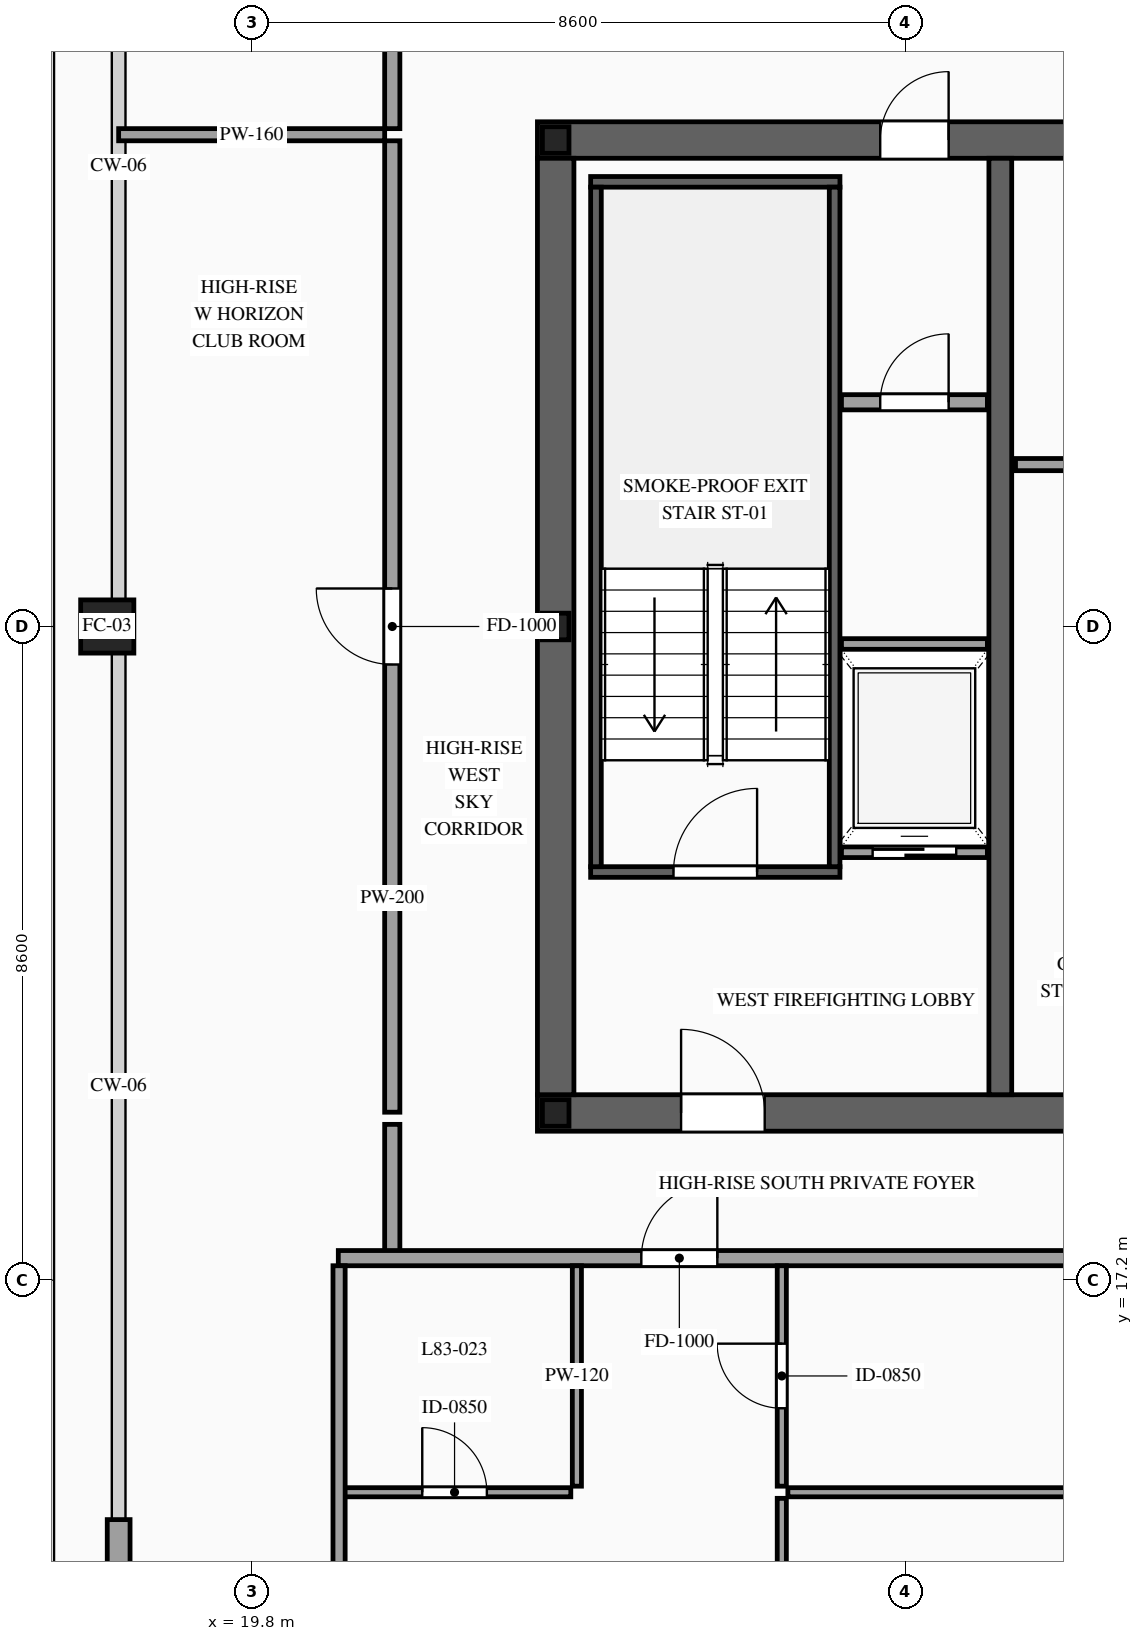
"""IFC4 building model, lengths in metres.
Left out: names, types, materials, properties, quantities, classifications, styles, units other than length and angle.
Written with IfcOpenShell. Run it as: python <this file> out.ifc"""

import sys

from ifc_helpers import new_model, si_unit, direction, frame, frame_2d, origin, origin_2d, place, context, subcontext, project, spatial, rectangle, hollow_rectangle, i_section, extrude, source, transform, mapped, element, fill, save


model = new_model("IFC4")
c1 = context("Model", 3, precision=1e-05, world=origin(), true_north=direction((0.0, 1.0)))
c2 = subcontext(c1, "Body", "Model", "MODEL_VIEW")
j1 = project(units=[si_unit("LENGTHUNIT", "METRE"), si_unit("PLANEANGLEUNIT", "RADIAN")], contexts=[c1])
p1 = place(None, origin())
s1 = spatial("IfcSite", under=j1, at=p1, CompositionType="ELEMENT")
p2 = place(p1, origin())
s2 = spatial("IfcBuilding", under=s1, at=p2, CompositionType="ELEMENT")
p3 = place(p2, frame((0.0, 0.0, 311.2)))
s3 = spatial("IfcBuildingStorey", under=s2, at=p3, CompositionType="ELEMENT", Elevation=311.2)
p4 = place(p3, frame((23.56, 19.4, 0.0), z_axis=(0.0, 0.0, 1.0), x_axis=(1.0, 0.0, 0.0)))
e1 = element("IfcWall", 1, at=p4, inside=s3, PredefinedType="SHEAR", context=c2, shape_type="SweptSolid", body=[
    extrude(rectangle(XDim=26.88, YDim=0.48, at=frame_2d((13.44, 0.0))), origin(), (0.0, 0.0, 1.0), 3.5),
])
p5 = place(p4, frame((1.89, 0.0, 0.0)))
e2 = element("IfcOpeningElement", 2, at=p5, cuts=e1, PredefinedType="OPENING", context=c2, shape_type="SweptSolid", body=[
    extrude(rectangle(XDim=1.1, YDim=2.2, at=frame_2d((0.55, 1.1))), frame((0.0, 0.255, 0.0), z_axis=(0.0, -1.0, 0.0), x_axis=(1.0, 0.0, 0.0)), (0.0, 0.0, 1.0), 0.51),
])
p6 = place(p4, frame((9.79, 0.0, 0.0)))
e3 = element("IfcOpeningElement", 3, at=p6, cuts=e1, PredefinedType="OPENING", context=c2, shape_type="SweptSolid", body=[
    extrude(rectangle(XDim=1.1, YDim=2.2, at=frame_2d((0.55, 1.1))), frame((0.0, 0.255, 0.0), z_axis=(0.0, -1.0, 0.0), x_axis=(1.0, 0.0, 0.0)), (0.0, 0.0, 1.0), 0.51),
])
p7 = place(p4, frame((22.99, 0.0, 0.0)))
e4 = element("IfcOpeningElement", 4, at=p7, cuts=e1, PredefinedType="OPENING", context=c2, shape_type="SweptSolid", body=[
    extrude(rectangle(XDim=1.1, YDim=2.2, at=frame_2d((0.55, 1.1))), frame((0.0, 0.255, 0.0), z_axis=(0.0, -1.0, 0.0), x_axis=(1.0, 0.0, 0.0)), (0.0, 0.0, 1.0), 0.51),
])
p8 = place(p4, frame((19.61, 0.0, 0.0)))
e5 = element("IfcOpeningElement", 5, at=p8, cuts=e1, PredefinedType="OPENING", context=c2, shape_type="SweptSolid", body=[
    extrude(rectangle(XDim=0.9, YDim=2.15, at=frame_2d((0.45, 1.075))), frame((0.0, 0.255, 0.0), z_axis=(0.0, -1.0, 0.0), x_axis=(1.0, 0.0, 0.0)), (0.0, 0.0, 1.0), 0.51),
])
p9 = place(p4, frame((18.17, 0.0, 0.0)))
e6 = element("IfcOpeningElement", 6, at=p9, cuts=e1, PredefinedType="OPENING", context=c2, shape_type="SweptSolid", body=[
    extrude(rectangle(XDim=0.9, YDim=2.15, at=frame_2d((0.45, 1.075))), frame((0.0, 0.255, 0.0), z_axis=(0.0, -1.0, 0.0), x_axis=(1.0, 0.0, 0.0)), (0.0, 0.0, 1.0), 0.51),
])
p10 = place(p3, frame((23.56, 32.2, 0.0), z_axis=(0.0, 0.0, 1.0), x_axis=(1.0, 0.0, 0.0)))
e7 = element("IfcWall", 7, at=p10, inside=s3, PredefinedType="SHEAR", context=c2, shape_type="SweptSolid", body=[
    extrude(rectangle(XDim=26.88, YDim=0.48, at=frame_2d((13.44, 0.0))), origin(), (0.0, 0.0, 1.0), 3.5),
])
p11 = place(p10, frame((4.51, 0.0, 0.0)))
e8 = element("IfcOpeningElement", 8, at=p11, cuts=e7, PredefinedType="OPENING", context=c2, shape_type="SweptSolid", body=[
    extrude(rectangle(XDim=0.9, YDim=2.15, at=frame_2d((0.45, 1.075))), frame((0.0, 0.255, 0.0), z_axis=(0.0, -1.0, 0.0), x_axis=(1.0, 0.0, 0.0)), (0.0, 0.0, 1.0), 0.51),
])
p12 = place(p10, frame((9.79, 0.0, 0.0)))
e9 = element("IfcOpeningElement", 9, at=p12, cuts=e7, PredefinedType="OPENING", context=c2, shape_type="SweptSolid", body=[
    extrude(rectangle(XDim=1.1, YDim=2.2, at=frame_2d((0.55, 1.1))), frame((0.0, 0.255, 0.0), z_axis=(0.0, -1.0, 0.0), x_axis=(1.0, 0.0, 0.0)), (0.0, 0.0, 1.0), 0.51),
])
p13 = place(p10, frame((15.64, 0.0, 0.0)))
e10 = element("IfcOpeningElement", 10, at=p13, cuts=e7, PredefinedType="OPENING", context=c2, shape_type="SweptSolid", body=[
    extrude(rectangle(XDim=1.1, YDim=2.2, at=frame_2d((0.55, 1.1))), frame((0.0, 0.255, 0.0), z_axis=(0.0, -1.0, 0.0), x_axis=(1.0, 0.0, 0.0)), (0.0, 0.0, 1.0), 0.51),
])
p14 = place(p10, frame((18.74, 0.0, 0.0)))
e11 = element("IfcOpeningElement", 11, at=p14, cuts=e7, PredefinedType="OPENING", context=c2, shape_type="SweptSolid", body=[
    extrude(rectangle(XDim=1.1, YDim=2.2, at=frame_2d((0.55, 1.1))), frame((0.0, 0.255, 0.0), z_axis=(0.0, -1.0, 0.0), x_axis=(1.0, 0.0, 0.0)), (0.0, 0.0, 1.0), 0.51),
])
m1 = source(origin(), c2, "Body", "SweptSolid", [
    extrude(rectangle(XDim=12.32, YDim=0.48, at=frame_2d((6.16, 0.0))), origin(), (0.0, 0.0, 1.0), 3.5),
])
p15 = place(p3, frame((23.8, 19.64, 0.0), z_axis=(0.0, 0.0, 1.0), x_axis=(0.0, 1.0, 0.0)))
e12 = element("IfcWall", 12, at=p15, inside=s3, PredefinedType="SHEAR", context=c2, shape_type="MappedRepresentation", body=[
    mapped(m1, transform((0.0, 0.0, 0.0), scale=1.0)),
])
m2 = source(origin(), c2, "Body", "SweptSolid", [
    extrude(rectangle(XDim=12.32, YDim=0.3, at=frame_2d((6.16, 0.0))), origin(), (0.0, 0.0, 1.0), 3.5),
])
p16 = place(p3, frame((29.65, 19.64, 0.0), z_axis=(0.0, 0.0, 1.0), x_axis=(0.0, 1.0, 0.0)))
e13 = element("IfcWall", 13, at=p16, inside=s3, PredefinedType="SOLIDWALL", context=c2, shape_type="MappedRepresentation", body=[
    mapped(m2, transform((0.0, 0.0, 0.0), scale=1.0)),
])
m3 = source(origin(), c2, "Body", "SweptSolid", [
    extrude(i_section(OverallWidth=0.35, OverallDepth=0.35, WebThickness=0.012, FlangeThickness=0.019, at=origin_2d()), origin(), (0.0, 0.0, 1.0), 3.5),
])
for number, where, z_axis, x_axis in (
    (14, (23.8, 19.4, 0.0), (0.0, 0.0, 1.0), (1.0, 0.0, 0.0)),
    (15, (23.8, 25.8, 0.0), (0.0, 0.0, 1.0), (1.0, 0.0, 0.0)),
    (16, (23.8, 32.2, 0.0), (0.0, 0.0, 1.0), (1.0, 0.0, 0.0)),
):
    element("IfcColumn", number, at=place(p3, frame(where, z_axis=z_axis, x_axis=x_axis)), inside=s3, PredefinedType="COLUMN", context=c2, shape_type="MappedRepresentation", body=[
        mapped(m3, transform((0.0, 0.0, 0.0), scale=1.0)),
    ])
m4 = source(origin(), c2, "Body", "SweptSolid", [
    extrude(hollow_rectangle(XDim=0.7, YDim=0.7, WallThickness=0.032, at=origin_2d()), origin(), (0.0, 0.0, 1.0), 3.5),
])
p17 = place(p3, frame((17.9, 25.8, 0.0), z_axis=(0.0, 0.0, 1.0), x_axis=(1.0, 0.0, 0.0)))
e17 = element("IfcColumn", 17, at=p17, inside=s3, PredefinedType="COLUMN", context=c2, shape_type="MappedRepresentation", body=[
    mapped(m4, transform((0.0, 0.0, 0.0), scale=1.0)),
])
m5 = source(origin(), c2, "Body", "SweptSolid", [
    extrude(rectangle(XDim=3.25, YDim=0.3, at=frame_2d((1.625, 0.0))), origin(), (0.0, 0.0, 1.0), 2.885),
])
p18 = place(p3, frame((18.05, 10.8, 0.0), z_axis=(0.0, 0.0, 1.0), x_axis=(0.0, 1.0, 0.0)))
e18 = element("IfcWall", 18, at=p18, inside=s3, PredefinedType="SOLIDWALL", context=c2, shape_type="MappedRepresentation", body=[
    mapped(m5, transform((0.0, 0.0, 0.0), scale=1.0)),
])
p19 = place(p3, frame((27.56, 22.83, 0.0), z_axis=(0.0, 0.0, 1.0), x_axis=(1.0, 0.0, 0.0)))
e19 = element("IfcWall", 19, at=p19, inside=s3, PredefinedType="SOLIDWALL", context=c2, shape_type="SweptSolid", body=[
    extrude(rectangle(XDim=1.92, YDim=0.14, at=frame_2d((0.96, 0.0))), origin(), (0.0, 0.0, 1.0), 3.28),
])
p20 = place(p19, frame((0.41, 0.0, 0.0)))
e20 = element("IfcOpeningElement", 20, at=p20, cuts=e19, PredefinedType="OPENING", context=c2, shape_type="SweptSolid", body=[
    extrude(rectangle(XDim=1.1, YDim=2.2, at=frame_2d((0.55, 1.1))), frame((0.0, 0.085, 0.0), z_axis=(0.0, -1.0, 0.0), x_axis=(1.0, 0.0, 0.0)), (0.0, 0.0, 1.0), 0.17),
])
m6 = source(origin(), c2, "Body", "SweptSolid", [
    extrude(rectangle(XDim=1.92, YDim=0.14, at=frame_2d((0.96, 0.0))), origin(), (0.0, 0.0, 1.0), 3.28),
])
p21 = place(p3, frame((27.56, 25.57, 0.0), z_axis=(0.0, 0.0, 1.0), x_axis=(1.0, 0.0, 0.0)))
e21 = element("IfcWall", 21, at=p21, inside=s3, PredefinedType="SOLIDWALL", context=c2, shape_type="MappedRepresentation", body=[
    mapped(m6, transform((0.0, 0.0, 0.0), scale=1.0)),
])
p22 = place(p3, frame((24.26, 22.57, 0.0), z_axis=(0.0, 0.0, 1.0), x_axis=(1.0, 0.0, 0.0)))
e22 = element("IfcWall", 22, at=p22, inside=s3, PredefinedType="SOLIDWALL", context=c2, shape_type="SweptSolid", body=[
    extrude(rectangle(XDim=3.28, YDim=0.14, at=frame_2d((1.64, 0.0))), origin(), (0.0, 0.0, 1.0), 3.28),
])
p23 = place(p22, frame((1.09, 0.0, 0.0)))
e23 = element("IfcOpeningElement", 23, at=p23, cuts=e22, PredefinedType="OPENING", context=c2, shape_type="SweptSolid", body=[
    extrude(rectangle(XDim=1.1, YDim=2.2, at=frame_2d((0.55, 1.1))), frame((0.0, 0.085, 0.0), z_axis=(0.0, -1.0, 0.0), x_axis=(1.0, 0.0, 0.0)), (0.0, 0.0, 1.0), 0.17),
])
m7 = source(origin(), c2, "Body", "SweptSolid", [
    extrude(rectangle(XDim=3.28, YDim=0.14, at=frame_2d((1.64, 0.0))), origin(), (0.0, 0.0, 1.0), 3.28),
])
p24 = place(p3, frame((24.26, 31.65, 0.0), z_axis=(0.0, 0.0, 1.0), x_axis=(1.0, 0.0, 0.0)))
e24 = element("IfcWall", 24, at=p24, inside=s3, PredefinedType="SOLIDWALL", context=c2, shape_type="MappedRepresentation", body=[
    mapped(m7, transform((0.0, 0.0, 0.0), scale=1.0)),
])
m8 = source(origin(), c2, "Body", "SweptSolid", [
    extrude(rectangle(XDim=8.94, YDim=0.14, at=frame_2d((4.47, 0.0))), origin(), (0.0, 0.0, 1.0), 3.28),
])
for number, where, z_axis, x_axis in (
    (25, (24.33, 22.64, 0.0), (0.0, 0.0, 1.0), (0.0, 1.0, 0.0)),
    (26, (27.47, 22.64, 0.0), (0.0, 0.0, 1.0), (0.0, 1.0, 0.0)),
):
    element("IfcWall", number, at=place(p3, frame(where, z_axis=z_axis, x_axis=x_axis)), inside=s3, PredefinedType="SOLIDWALL", context=c2, shape_type="MappedRepresentation", body=[
        mapped(m8, transform((0.0, 0.0, 0.0), scale=1.0)),
    ])
p25 = place(p3, frame((27.56, 28.75, 0.0), z_axis=(0.0, 0.0, 1.0), x_axis=(1.0, 0.0, 0.0)))
e27 = element("IfcWall", 27, at=p25, inside=s3, PredefinedType="PARTITIONING", context=c2, shape_type="SweptSolid", body=[
    extrude(rectangle(XDim=1.92, YDim=0.2, at=frame_2d((0.96, 0.0))), origin(), (0.0, 0.0, 1.0), 3.28),
])
p26 = place(p25, frame((0.51, 0.0, 0.0)))
e28 = element("IfcOpeningElement", 28, at=p26, cuts=e27, PredefinedType="OPENING", context=c2, shape_type="SweptSolid", body=[
    extrude(rectangle(XDim=0.9, YDim=2.15, at=frame_2d((0.45, 1.075))), frame((0.0, 0.115, 0.0), z_axis=(0.0, -1.0, 0.0), x_axis=(1.0, 0.0, 0.0)), (0.0, 0.0, 1.0), 0.23),
])
m9 = source(origin(), c2, "Body", "SweptSolid", [
    extrude(rectangle(XDim=2.47, YDim=0.16, at=frame_2d((1.235, 0.0))), origin(), (0.0, 0.0, 1.0), 3.28),
])
p27 = place(p3, frame((29.85, 27.93, 0.0), z_axis=(0.0, 0.0, 1.0), x_axis=(1.0, 0.0, 0.0)))
e29 = element("IfcWall", 29, at=p27, inside=s3, PredefinedType="PARTITIONING", context=c2, shape_type="MappedRepresentation", body=[
    mapped(m9, transform((0.0, 0.0, 0.0), scale=1.0)),
])
m10 = source(origin(), c2, "Body", "SweptSolid", [
    extrude(rectangle(XDim=1.7, YDim=0.2, at=frame_2d((0.85, 0.0))), origin(), (0.0, 0.0, 1.0), 3.28),
])
for number, where, z_axis, x_axis in (
    (30, (21.65, 32.35, 0.0), (0.0, 0.0, 1.0), (0.0, 1.0, 0.0)),
    (31, (21.65, 17.55, 0.0), (0.0, 0.0, 1.0), (0.0, 1.0, 0.0)),
):
    element("IfcWall", number, at=place(p3, frame(where, z_axis=z_axis, x_axis=x_axis)), inside=s3, PredefinedType="PARTITIONING", context=c2, shape_type="MappedRepresentation", body=[
        mapped(m10, transform((0.0, 0.0, 0.0), scale=1.0)),
    ])
p28 = place(p3, frame((20.94, 17.49, 0.0), z_axis=(0.0, 0.0, 1.0), x_axis=(1.0, 0.0, 0.0)))
e32 = element("IfcWall", 32, at=p28, inside=s3, PredefinedType="PARTITIONING", context=c2, shape_type="SweptSolid", body=[
    extrude(rectangle(XDim=10.198, YDim=0.2, at=frame_2d((5.099, 0.0))), origin(), (0.0, 0.0, 1.0), 3.28),
])
p29 = place(p28, frame((3.987, 0.0, 0.0)))
e33 = element("IfcOpeningElement", 33, at=p29, cuts=e32, PredefinedType="OPENING", context=c2, shape_type="SweptSolid", body=[
    extrude(rectangle(XDim=1.0, YDim=2.2, at=frame_2d((0.5, 1.1))), frame((0.0, 0.115, 0.0), z_axis=(0.0, -1.0, 0.0), x_axis=(1.0, 0.0, 0.0)), (0.0, 0.0, 1.0), 0.23),
])
p30 = place(p3, frame((20.94, 14.41, 0.0), z_axis=(0.0, 0.0, 1.0), x_axis=(1.0, 0.0, 0.0)))
e34 = element("IfcWall", 34, at=p30, inside=s3, PredefinedType="PARTITIONING", context=c2, shape_type="SweptSolid", body=[
    extrude(rectangle(XDim=3.059, YDim=0.12, at=frame_2d((1.53, 0.0))), origin(), (0.0, 0.0, 1.0), 3.28),
])
p31 = place(p30, frame((1.104, 0.0, 0.0)))
e35 = element("IfcOpeningElement", 35, at=p31, cuts=e34, PredefinedType="OPENING", context=c2, shape_type="SweptSolid", body=[
    extrude(rectangle(XDim=0.85, YDim=2.1, at=frame_2d((0.425, 1.05))), frame((0.0, 0.075, 0.0), z_axis=(0.0, -1.0, 0.0), x_axis=(1.0, 0.0, 0.0)), (0.0, 0.0, 1.0), 0.15),
])
m11 = source(origin(), c2, "Body", "SweptSolid", [
    extrude(rectangle(XDim=2.9, YDim=0.12, at=frame_2d((1.45, 0.0))), origin(), (0.0, 0.0, 1.0), 3.28),
])
p32 = place(p3, frame((24.079, 14.49, 0.0), z_axis=(0.0, 0.0, 1.0), x_axis=(0.0, 1.0, 0.0)))
e36 = element("IfcWall", 36, at=p32, inside=s3, PredefinedType="PARTITIONING", context=c2, shape_type="MappedRepresentation", body=[
    mapped(m11, transform((0.0, 0.0, 0.0), scale=1.0)),
])
m12 = source(origin(), c2, "Body", "SweptSolid", [
    extrude(rectangle(XDim=4.283, YDim=0.12, at=frame_2d((2.142, 0.0))), origin(), (0.0, 0.0, 1.0), 3.28),
])
p33 = place(p3, frame((26.855, 14.41, 0.0), z_axis=(0.0, 0.0, 1.0), x_axis=(1.0, 0.0, 0.0)))
e37 = element("IfcWall", 37, at=p33, inside=s3, PredefinedType="PARTITIONING", context=c2, shape_type="MappedRepresentation", body=[
    mapped(m12, transform((0.0, 0.0, 0.0), scale=1.0)),
])
p34 = place(p3, frame((26.775, 14.49, 0.0), z_axis=(0.0, 0.0, 1.0), x_axis=(0.0, 1.0, 0.0)))
e38 = element("IfcWall", 38, at=p34, inside=s3, PredefinedType="PARTITIONING", context=c2, shape_type="SweptSolid", body=[
    extrude(rectangle(XDim=2.9, YDim=0.12, at=frame_2d((1.45, 0.0))), origin(), (0.0, 0.0, 1.0), 3.28),
])
p35 = place(p34, frame((1.025, 0.0, 0.0)))
e39 = element("IfcOpeningElement", 39, at=p35, cuts=e38, PredefinedType="OPENING", context=c2, shape_type="SweptSolid", body=[
    extrude(rectangle(XDim=0.85, YDim=2.1, at=frame_2d((0.425, 1.05))), frame((0.0, 0.075, 0.0), z_axis=(0.0, -1.0, 0.0), x_axis=(1.0, 0.0, 0.0)), (0.0, 0.0, 1.0), 0.15),
])
p36 = place(p3, frame((26.775, 6.85, 0.0), z_axis=(0.0, 0.0, 1.0), x_axis=(0.0, 1.0, 0.0)))
e40 = element("IfcWall", 40, at=p36, inside=s3, PredefinedType="PARTITIONING", context=c2, shape_type="SweptSolid", body=[
    extrude(rectangle(XDim=7.48, YDim=0.12, at=frame_2d((3.74, 0.0))), origin(), (0.0, 0.0, 1.0), 3.28),
])
p37 = place(p36, frame((3.29, 0.0, 0.0)))
e41 = element("IfcOpeningElement", 41, at=p37, cuts=e40, PredefinedType="OPENING", context=c2, shape_type="SweptSolid", body=[
    extrude(rectangle(XDim=0.9, YDim=2.15, at=frame_2d((0.45, 1.075))), frame((0.0, 0.075, 0.0), z_axis=(0.0, -1.0, 0.0), x_axis=(1.0, 0.0, 0.0)), (0.0, 0.0, 1.0), 0.15),
])
m13 = source(origin(), c2, "Body", "SweptSolid", [
    extrude(rectangle(XDim=10.39, YDim=0.16, at=frame_2d((5.195, 0.0))), origin(), (0.0, 0.0, 1.0), 3.28),
])
p38 = place(p3, frame((20.95, 7.0, 0.0), z_axis=(0.0, 0.0, 1.0), x_axis=(0.0, 1.0, 0.0)))
e42 = element("IfcWall", 42, at=p38, inside=s3, PredefinedType="PARTITIONING", context=c2, shape_type="MappedRepresentation", body=[
    mapped(m13, transform((0.0, 0.0, 0.0), scale=1.0)),
])
p39 = place(p3, frame((21.65, 19.41, 0.0), z_axis=(0.0, 0.0, 1.0), x_axis=(0.0, 1.0, 0.0)))
e43 = element("IfcWall", 43, at=p39, inside=s3, PredefinedType="PARTITIONING", context=c2, shape_type="SweptSolid", body=[
    extrude(rectangle(XDim=12.78, YDim=0.2, at=frame_2d((6.39, 0.0))), origin(), (0.0, 0.0, 1.0), 3.28),
])
p40 = place(p39, frame((5.89, 0.0, 0.0)))
e44 = element("IfcOpeningElement", 44, at=p40, cuts=e43, PredefinedType="OPENING", context=c2, shape_type="SweptSolid", body=[
    extrude(rectangle(XDim=1.0, YDim=2.2, at=frame_2d((0.5, 1.1))), frame((0.0, 0.115, 0.0), z_axis=(0.0, -1.0, 0.0), x_axis=(1.0, 0.0, 0.0)), (0.0, 0.0, 1.0), 0.23),
])
m14 = source(origin(), c2, "Body", "SweptSolid", [
    extrude(rectangle(XDim=3.5, YDim=0.16, at=frame_2d((1.75, 0.0))), origin(), (0.0, 0.0, 1.0), 2.825),
])
p41 = place(p3, frame((18.05, 32.27, 0.0), z_axis=(0.0, 0.0, 1.0), x_axis=(1.0, 0.0, 0.0)))
e45 = element("IfcWall", 45, at=p41, inside=s3, PredefinedType="PARTITIONING", context=c2, shape_type="MappedRepresentation", body=[
    mapped(m14, transform((0.0, 0.0, 0.0), scale=1.0)),
])
m15 = source(origin(), c2, "Body", "SweptSolid", [
    extrude(rectangle(XDim=1.1, YDim=2.2, at=frame_2d((0.55, 1.1))), frame((0.0, 0.025, 0.0), z_axis=(0.0, -1.0, 0.0), x_axis=(1.0, 0.0, 0.0)), (0.0, 0.0, 1.0), 0.05),
])
p42 = place(p20, origin())
e46 = element("IfcDoor", 46, at=p42, inside=s3, OperationType="SLIDING_TO_LEFT", PredefinedType="DOOR", context=c2, shape_type="MappedRepresentation", body=[
    mapped(m15, transform((0.0, 0.0, 0.0), scale=1.0)),
])
fill(e20, e46)
m16 = source(origin(), c2, "Body", "SweptSolid", [
    extrude(rectangle(XDim=1.1, YDim=2.2, at=frame_2d((0.55, 1.1))), frame((0.0, 0.025, 0.0), z_axis=(0.0, -1.0, 0.0), x_axis=(1.0, 0.0, 0.0)), (0.0, 0.0, 1.0), 0.05),
])
p43 = place(p23, origin())
e47 = element("IfcDoor", 47, at=p43, inside=s3, OperationType="SINGLE_SWING_RIGHT", PredefinedType="DOOR", context=c2, shape_type="MappedRepresentation", body=[
    mapped(m16, transform((0.0, 0.0, 0.0), scale=1.0)),
])
fill(e23, e47)
p44 = place(p5, origin())
e48 = element("IfcDoor", 48, at=p44, inside=s3, OperationType="SINGLE_SWING_LEFT", PredefinedType="DOOR", context=c2, shape_type="MappedRepresentation", body=[
    mapped(m16, transform((0.0, 0.0, 0.0), scale=1.0)),
])
fill(e2, e48)
m17 = source(origin(), c2, "Body", "SweptSolid", [
    extrude(rectangle(XDim=0.9, YDim=2.15, at=frame_2d((0.45, 1.075))), frame((0.0, 0.025, 0.0), z_axis=(0.0, -1.0, 0.0), x_axis=(1.0, 0.0, 0.0)), (0.0, 0.0, 1.0), 0.05),
])
p45 = place(p11, origin())
e49 = element("IfcDoor", 49, at=p45, inside=s3, OperationType="SINGLE_SWING_RIGHT", PredefinedType="DOOR", context=c2, shape_type="MappedRepresentation", body=[
    mapped(m17, transform((0.0, 0.0, 0.0), scale=1.0)),
])
fill(e8, e49)
p46 = place(p26, origin())
e50 = element("IfcDoor", 50, at=p46, inside=s3, OperationType="SINGLE_SWING_RIGHT", PredefinedType="DOOR", context=c2, shape_type="MappedRepresentation", body=[
    mapped(m17, transform((0.0, 0.0, 0.0), scale=1.0)),
])
fill(e28, e50)
m18 = source(origin(), c2, "Body", "SweptSolid", [
    extrude(rectangle(XDim=1.0, YDim=2.2, at=frame_2d((0.5, 1.1))), frame((0.0, 0.025, 0.0), z_axis=(0.0, -1.0, 0.0), x_axis=(1.0, 0.0, 0.0)), (0.0, 0.0, 1.0), 0.05),
])
p47 = place(p29, origin())
e51 = element("IfcDoor", 51, at=p47, inside=s3, OperationType="SINGLE_SWING_RIGHT", PredefinedType="DOOR", context=c2, shape_type="MappedRepresentation", body=[
    mapped(m18, transform((0.0, 0.0, 0.0), scale=1.0)),
])
fill(e33, e51)
m19 = source(origin(), c2, "Body", "SweptSolid", [
    extrude(rectangle(XDim=0.85, YDim=2.1, at=frame_2d((0.425, 1.05))), frame((0.0, 0.025, 0.0), z_axis=(0.0, -1.0, 0.0), x_axis=(1.0, 0.0, 0.0)), (0.0, 0.0, 1.0), 0.05),
])
p48 = place(p31, origin())
e52 = element("IfcDoor", 52, at=p48, inside=s3, OperationType="SINGLE_SWING_LEFT", PredefinedType="DOOR", context=c2, shape_type="MappedRepresentation", body=[
    mapped(m19, transform((0.0, 0.0, 0.0), scale=1.0)),
])
fill(e35, e52)
p49 = place(p35, origin())
e53 = element("IfcDoor", 53, at=p49, inside=s3, OperationType="SINGLE_SWING_RIGHT", PredefinedType="DOOR", context=c2, shape_type="MappedRepresentation", body=[
    mapped(m19, transform((0.0, 0.0, 0.0), scale=1.0)),
])
fill(e39, e53)
p50 = place(p40, origin())
e54 = element("IfcDoor", 54, at=p50, inside=s3, OperationType="SINGLE_SWING_RIGHT", PredefinedType="DOOR", context=c2, shape_type="MappedRepresentation", body=[
    mapped(m18, transform((0.0, 0.0, 0.0), scale=1.0)),
])
fill(e44, e54)
save(model, sys.argv[1])
